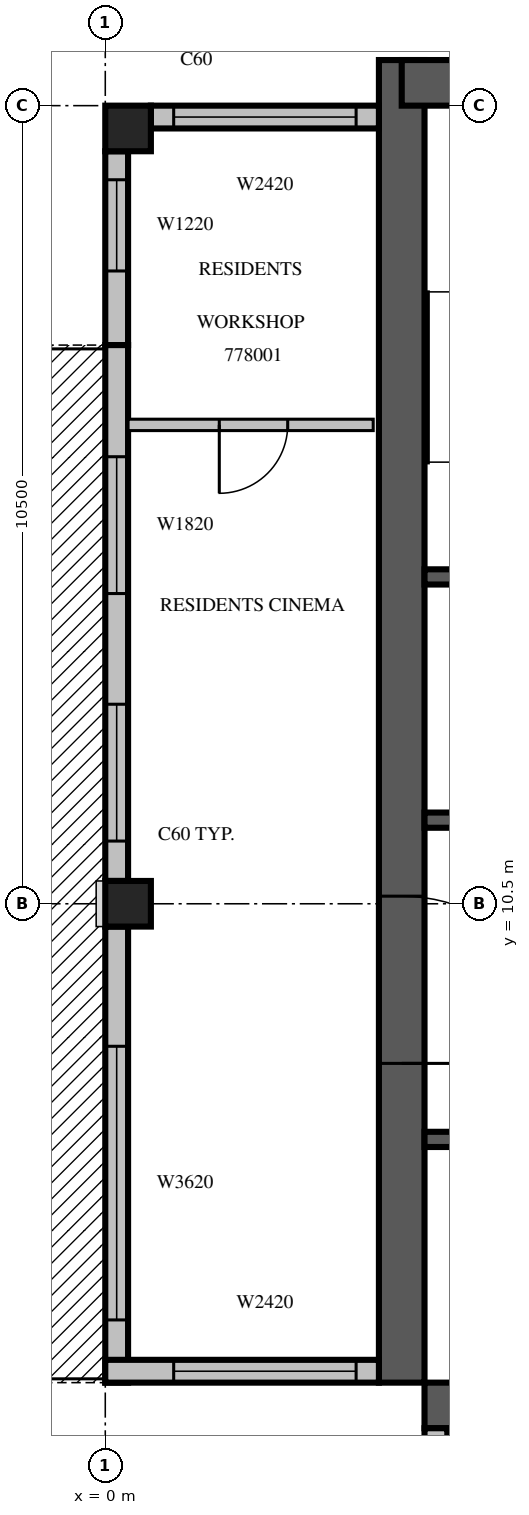
"""IFC4 building model, lengths in metres.
Left out: names, types, materials, properties, quantities, classifications, styles, units other than length and angle.
Written with IfcOpenShell. Run it as: python <this file> out.ifc"""

import sys

from ifc_helpers import new_model, si_unit, direction, frame, frame_2d, origin, origin_2d, place, context, subcontext, project, spatial, rectangle, extrude, source, transform, mapped, element, fill, save


model = new_model("IFC4")
c1 = context("Model", 3, precision=1e-05, world=origin(), true_north=direction((0.0, 1.0)))
c2 = subcontext(c1, "Body", "Model", "MODEL_VIEW")
j1 = project(units=[si_unit("LENGTHUNIT", "METRE"), si_unit("PLANEANGLEUNIT", "RADIAN")], contexts=[c1])
p1 = place(None, origin())
s1 = spatial("IfcSite", under=j1, at=p1, CompositionType="ELEMENT")
p2 = place(p1, origin())
s2 = spatial("IfcBuilding", under=s1, at=p2, CompositionType="ELEMENT")
p3 = place(p2, frame((0.0, 0.0, 333.5)))
s3 = spatial("IfcBuildingStorey", under=s2, at=p3, CompositionType="ELEMENT", Elevation=333.5)
m1 = source(origin(), c2, "Body", "SweptSolid", [
    extrude(rectangle(XDim=0.6, YDim=0.6, at=origin_2d()), origin(), (0.0, 0.0, 1.0), 3.5),
])
for number, where, z_axis, x_axis in (
    (1, (0.3, 10.5, 0.0), (0.0, 0.0, 1.0), (1.0, 0.0, 0.0)),
    (2, (0.3, 20.7, 0.0), (0.0, 0.0, 1.0), (1.0, 0.0, 0.0)),
):
    element("IfcColumn", number, at=place(p3, frame(where, z_axis=z_axis, x_axis=x_axis)), inside=s3, PredefinedType="COLUMN", context=c2, shape_type="MappedRepresentation", body=[
        mapped(m1, transform((0.0, 0.0, 0.0), scale=1.0)),
    ])
m2 = source(origin(), c2, "Body", "SweptSolid", [
    extrude(rectangle(XDim=17.4, YDim=0.6, at=frame_2d((8.7, 0.0))), origin(), (0.0, 0.0, 1.0), 3.5),
])
p4 = place(p3, frame((3.9, 4.2, 0.0), z_axis=(0.0, 0.0, 1.0), x_axis=(0.0, 1.0, 0.0)))
e3 = element("IfcWall", 3, at=p4, inside=s3, PredefinedType="SHEAR", context=c2, shape_type="MappedRepresentation", body=[
    mapped(m2, transform((0.0, 0.0, 0.0), scale=1.0)),
])
m3 = source(origin(), c2, "Body", "SweptSolid", [
    extrude(rectangle(XDim=2.2, YDim=2.1, at=frame_2d((1.1, 1.05))), frame((0.0, 0.31, 0.0), z_axis=(0.0, -1.0, 0.0), x_axis=(1.0, 0.0, 0.0)), (0.0, 0.0, 1.0), 0.62),
])
p5 = place(p4, frame((4.2, 0.0, 0.0)))
e4 = element("IfcOpeningElement", 4, at=p5, cuts=e3, PredefinedType="OPENING", context=c2, shape_type="MappedRepresentation", body=[
    mapped(m3, transform((0.0, 0.0, 0.0), scale=1.0)),
])
p6 = place(p3, frame((4.2, 3.9, 0.0), z_axis=(0.0, 0.0, 1.0), x_axis=(1.0, 0.0, 0.0)))
e5 = element("IfcWall", 5, at=p6, inside=s3, PredefinedType="SHEAR", context=c2, shape_type="MappedRepresentation", body=[
    mapped(m2, transform((0.0, 0.0, 0.0), scale=1.0)),
])
m4 = source(origin(), c2, "Body", "SweptSolid", [
    extrude(rectangle(XDim=0.9, YDim=2.1, at=frame_2d((0.45, 1.05))), frame((0.0, 0.31, 0.0), z_axis=(0.0, -1.0, 0.0), x_axis=(1.0, 0.0, 0.0)), (0.0, 0.0, 1.0), 0.62),
])
p7 = place(p6, frame((15.2, 0.0, 0.0)))
e6 = element("IfcOpeningElement", 6, at=p7, cuts=e5, PredefinedType="OPENING", context=c2, shape_type="MappedRepresentation", body=[
    mapped(m4, transform((0.0, 0.0, 0.0), scale=1.0)),
])
m5 = source(origin(), c2, "Body", "SweptSolid", [
    extrude(rectangle(XDim=6.6, YDim=0.6, at=frame_2d((3.3, 0.0))), origin(), (0.0, 0.0, 1.0), 3.5),
])
p8 = place(p3, frame((3.9, 21.3, 0.0), z_axis=(0.0, 0.0, 1.0), x_axis=(1.0, 0.0, 0.0)))
e7 = element("IfcWall", 7, at=p8, inside=s3, PredefinedType="SHEAR", context=c2, shape_type="MappedRepresentation", body=[
    mapped(m5, transform((0.0, 0.0, 0.0), scale=1.0)),
])
m6 = source(origin(), c2, "Body", "SweptSolid", [
    extrude(rectangle(XDim=1.2, YDim=2.4, at=frame_2d((0.6, 1.2))), frame((0.0, 0.31, 0.0), z_axis=(0.0, -1.0, 0.0), x_axis=(1.0, 0.0, 0.0)), (0.0, 0.0, 1.0), 0.62),
])
p9 = place(p8, frame((1.5, 0.0, 0.6)))
e8 = element("IfcOpeningElement", 8, at=p9, cuts=e7, PredefinedType="OPENING", context=c2, shape_type="MappedRepresentation", body=[
    mapped(m6, transform((0.0, 0.0, 0.0), scale=1.0)),
])
p10 = place(p8, frame((3.6, 0.0, 0.6)))
e9 = element("IfcOpeningElement", 9, at=p10, cuts=e7, PredefinedType="OPENING", context=c2, shape_type="MappedRepresentation", body=[
    mapped(m6, transform((0.0, 0.0, 0.0), scale=1.0)),
])
m7 = source(origin(), c2, "Body", "SweptSolid", [
    extrude(rectangle(XDim=3.0, YDim=0.3, at=frame_2d((1.5, 0.0))), origin(), (0.0, 0.0, 1.0), 3.1),
])
p11 = place(p3, frame((3.6, 20.85, 0.0), z_axis=(0.0, 0.0, 1.0), x_axis=(-1.0, 0.0, 0.0)))
e10 = element("IfcWall", 10, at=p11, inside=s3, PredefinedType="STANDARD", context=c2, shape_type="MappedRepresentation", body=[
    mapped(m7, transform((0.0, 0.0, 0.0), scale=1.0)),
])
m8 = source(origin(), c2, "Body", "SweptSolid", [
    extrude(rectangle(XDim=2.4, YDim=2.0, at=frame_2d((1.2, 1.0))), frame((0.0, 0.16, 0.0), z_axis=(0.0, -1.0, 0.0), x_axis=(1.0, 0.0, 0.0)), (0.0, 0.0, 1.0), 0.32),
])
p12 = place(p11, frame((0.3, 0.0, 0.6)))
e11 = element("IfcOpeningElement", 11, at=p12, cuts=e10, PredefinedType="OPENING", context=c2, shape_type="MappedRepresentation", body=[
    mapped(m8, transform((0.0, 0.0, 0.0), scale=1.0)),
])
p13 = place(p3, frame((0.15, 20.4, 0.0), z_axis=(0.0, 0.0, 1.0), x_axis=(0.0, -1.0, 0.0)))
e12 = element("IfcWall", 12, at=p13, inside=s3, PredefinedType="STANDARD", context=c2, shape_type="SweptSolid", body=[
    extrude(rectangle(XDim=2.55, YDim=0.3, at=frame_2d((1.275, 0.0))), origin(), (0.0, 0.0, 1.0), 3.1),
])
m9 = source(origin(), c2, "Body", "SweptSolid", [
    extrude(rectangle(XDim=1.2, YDim=2.0, at=frame_2d((0.6, 1.0))), frame((0.0, 0.16, 0.0), z_axis=(0.0, -1.0, 0.0), x_axis=(1.0, 0.0, 0.0)), (0.0, 0.0, 1.0), 0.32),
])
p14 = place(p13, frame((0.375, 0.0, 0.6)))
e13 = element("IfcOpeningElement", 13, at=p14, cuts=e12, PredefinedType="OPENING", context=c2, shape_type="MappedRepresentation", body=[
    mapped(m9, transform((0.0, 0.0, 0.0), scale=1.0)),
])
p15 = place(p3, frame((0.15, 17.85, 0.0), z_axis=(0.0, 0.0, 1.0), x_axis=(0.0, -1.0, 0.0)))
e14 = element("IfcWall", 14, at=p15, inside=s3, PredefinedType="STANDARD", context=c2, shape_type="SweptSolid", body=[
    extrude(rectangle(XDim=7.05, YDim=0.3, at=frame_2d((3.525, 0.0))), origin(), (0.0, 0.0, 1.0), 3.1),
])
m10 = source(origin(), c2, "Body", "SweptSolid", [
    extrude(rectangle(XDim=1.8, YDim=2.4, at=frame_2d((0.9, 1.2))), frame((0.0, 0.16, 0.0), z_axis=(0.0, -1.0, 0.0), x_axis=(1.0, 0.0, 0.0)), (0.0, 0.0, 1.0), 0.32),
])
p16 = place(p15, frame((4.725, 0.0, 0.0)))
e15 = element("IfcOpeningElement", 15, at=p16, cuts=e14, PredefinedType="OPENING", context=c2, shape_type="MappedRepresentation", body=[
    mapped(m10, transform((0.0, 0.0, 0.0), scale=1.0)),
])
m11 = source(origin(), c2, "Body", "SweptSolid", [
    extrude(rectangle(XDim=1.8, YDim=2.0, at=frame_2d((0.9, 1.0))), frame((0.0, 0.16, 0.0), z_axis=(0.0, -1.0, 0.0), x_axis=(1.0, 0.0, 0.0)), (0.0, 0.0, 1.0), 0.32),
])
p17 = place(p15, frame((1.469, 0.0, 0.6)))
e16 = element("IfcOpeningElement", 16, at=p17, cuts=e14, PredefinedType="OPENING", context=c2, shape_type="MappedRepresentation", body=[
    mapped(m11, transform((0.0, 0.0, 0.0), scale=1.0)),
])
m12 = source(origin(), c2, "Body", "SweptSolid", [
    extrude(rectangle(XDim=6.0, YDim=0.3, at=frame_2d((3.0, 0.0))), origin(), (0.0, 0.0, 1.0), 3.1),
])
p18 = place(p3, frame((0.15, 10.2, 0.0), z_axis=(0.0, 0.0, 1.0), x_axis=(0.0, -1.0, 0.0)))
e17 = element("IfcWall", 17, at=p18, inside=s3, PredefinedType="STANDARD", context=c2, shape_type="MappedRepresentation", body=[
    mapped(m12, transform((0.0, 0.0, 0.0), scale=1.0)),
])
m13 = source(origin(), c2, "Body", "SweptSolid", [
    extrude(rectangle(XDim=3.6, YDim=2.0, at=frame_2d((1.8, 1.0))), frame((0.0, 0.16, 0.0), z_axis=(0.0, -1.0, 0.0), x_axis=(1.0, 0.0, 0.0)), (0.0, 0.0, 1.0), 0.32),
])
p19 = place(p18, frame((1.575, 0.0, 0.6)))
e18 = element("IfcOpeningElement", 18, at=p19, cuts=e17, PredefinedType="OPENING", context=c2, shape_type="MappedRepresentation", body=[
    mapped(m13, transform((0.0, 0.0, 0.0), scale=1.0)),
])
m14 = source(origin(), c2, "Body", "SweptSolid", [
    extrude(rectangle(XDim=3.6, YDim=0.3, at=frame_2d((1.8, 0.0))), origin(), (0.0, 0.0, 1.0), 3.1),
])
p20 = place(p3, frame((0.0, 4.35, 0.0), z_axis=(0.0, 0.0, 1.0), x_axis=(1.0, 0.0, 0.0)))
e19 = element("IfcWall", 19, at=p20, inside=s3, PredefinedType="STANDARD", context=c2, shape_type="MappedRepresentation", body=[
    mapped(m14, transform((0.0, 0.0, 0.0), scale=1.0)),
])
p21 = place(p20, frame((0.9, 0.0, 0.6)))
e20 = element("IfcOpeningElement", 20, at=p21, cuts=e19, PredefinedType="OPENING", context=c2, shape_type="MappedRepresentation", body=[
    mapped(m8, transform((0.0, 0.0, 0.0), scale=1.0)),
])
p22 = place(p3, frame((4.35, 3.6, 0.0), z_axis=(0.0, 0.0, 1.0), x_axis=(0.0, -1.0, 0.0)))
e21 = element("IfcWall", 21, at=p22, inside=s3, PredefinedType="STANDARD", context=c2, shape_type="MappedRepresentation", body=[
    mapped(m14, transform((0.0, 0.0, 0.0), scale=1.0)),
])
p23 = place(p22, frame((0.3, 0.0, 0.6)))
e22 = element("IfcOpeningElement", 22, at=p23, cuts=e21, PredefinedType="OPENING", context=c2, shape_type="MappedRepresentation", body=[
    mapped(m8, transform((0.0, 0.0, 0.0), scale=1.0)),
])
m15 = source(origin(), c2, "Body", "SweptSolid", [
    extrude(rectangle(XDim=9.6, YDim=0.2, at=frame_2d((4.8, 0.0))), origin(), (0.0, 0.0, 1.0), 3.5),
])
p24 = place(p3, frame((4.2, 7.4, 0.0), z_axis=(0.0, 0.0, 1.0), x_axis=(1.0, 0.0, 0.0)))
e23 = element("IfcWall", 23, at=p24, inside=s3, PredefinedType="SOLIDWALL", context=c2, shape_type="MappedRepresentation", body=[
    mapped(m15, transform((0.0, 0.0, 0.0), scale=1.0)),
])
m16 = source(origin(), c2, "Body", "SweptSolid", [
    extrude(rectangle(XDim=1.1, YDim=2.1, at=frame_2d((0.55, 1.05))), frame((0.0, 0.11, 0.0), z_axis=(0.0, -1.0, 0.0), x_axis=(1.0, 0.0, 0.0)), (0.0, 0.0, 1.0), 0.22),
])
p25 = place(p24, frame((0.65, 0.0, 0.0)))
e24 = element("IfcOpeningElement", 24, at=p25, cuts=e23, PredefinedType="OPENING", context=c2, shape_type="MappedRepresentation", body=[
    mapped(m16, transform((0.0, 0.0, 0.0), scale=1.0)),
])
p26 = place(p24, frame((3.05, 0.0, 0.0)))
e25 = element("IfcOpeningElement", 25, at=p26, cuts=e23, PredefinedType="OPENING", context=c2, shape_type="MappedRepresentation", body=[
    mapped(m16, transform((0.0, 0.0, 0.0), scale=1.0)),
])
p27 = place(p24, frame((5.45, 0.0, 0.0)))
e26 = element("IfcOpeningElement", 26, at=p27, cuts=e23, PredefinedType="OPENING", context=c2, shape_type="MappedRepresentation", body=[
    mapped(m16, transform((0.0, 0.0, 0.0), scale=1.0)),
])
p28 = place(p24, frame((7.85, 0.0, 0.0)))
e27 = element("IfcOpeningElement", 27, at=p28, cuts=e23, PredefinedType="OPENING", context=c2, shape_type="MappedRepresentation", body=[
    mapped(m16, transform((0.0, 0.0, 0.0), scale=1.0)),
])
m17 = source(origin(), c2, "Body", "SweptSolid", [
    extrude(rectangle(XDim=4.8, YDim=0.2, at=frame_2d((2.4, 0.0))), origin(), (0.0, 0.0, 1.0), 3.5),
])
p29 = place(p3, frame((4.2, 11.6, 0.0), z_axis=(0.0, 0.0, 1.0), x_axis=(1.0, 0.0, 0.0)))
e28 = element("IfcWall", 28, at=p29, inside=s3, PredefinedType="SOLIDWALL", context=c2, shape_type="MappedRepresentation", body=[
    mapped(m17, transform((0.0, 0.0, 0.0), scale=1.0)),
])
p30 = place(p29, frame((0.65, 0.0, 0.0)))
e29 = element("IfcOpeningElement", 29, at=p30, cuts=e28, PredefinedType="OPENING", context=c2, shape_type="MappedRepresentation", body=[
    mapped(m16, transform((0.0, 0.0, 0.0), scale=1.0)),
])
p31 = place(p29, frame((3.05, 0.0, 0.0)))
e30 = element("IfcOpeningElement", 30, at=p31, cuts=e28, PredefinedType="OPENING", context=c2, shape_type="MappedRepresentation", body=[
    mapped(m16, transform((0.0, 0.0, 0.0), scale=1.0)),
])
p32 = place(p3, frame((4.2, 14.8, 0.0), z_axis=(0.0, 0.0, 1.0), x_axis=(1.0, 0.0, 0.0)))
e31 = element("IfcWall", 31, at=p32, inside=s3, PredefinedType="SOLIDWALL", context=c2, shape_type="MappedRepresentation", body=[
    mapped(m17, transform((0.0, 0.0, 0.0), scale=1.0)),
])
m18 = source(origin(), c2, "Body", "SweptSolid", [
    extrude(rectangle(XDim=3.225, YDim=0.15, at=frame_2d((1.613, 0.0))), origin(), (0.0, 0.0, 1.0), 3.1),
])
p33 = place(p3, frame((0.3, 16.8, 0.0), z_axis=(0.0, 0.0, 1.0), x_axis=(1.0, 0.0, 0.0)))
e32 = element("IfcWall", 32, at=p33, inside=s3, PredefinedType="PARTITIONING", context=c2, shape_type="MappedRepresentation", body=[
    mapped(m18, transform((0.0, 0.0, 0.0), scale=1.0)),
])
m19 = source(origin(), c2, "Body", "SweptSolid", [
    extrude(rectangle(XDim=0.9, YDim=2.1, at=frame_2d((0.45, 1.05))), frame((0.0, 0.085, 0.0), z_axis=(0.0, -1.0, 0.0), x_axis=(1.0, 0.0, 0.0)), (0.0, 0.0, 1.0), 0.17),
])
p34 = place(p33, frame((1.2, 0.0, 0.0)))
e33 = element("IfcOpeningElement", 33, at=p34, cuts=e32, PredefinedType="OPENING", context=c2, shape_type="MappedRepresentation", body=[
    mapped(m19, transform((0.0, 0.0, 0.0), scale=1.0)),
])
m20 = source(origin(), c2, "Body", "SweptSolid", [
    extrude(rectangle(XDim=2.4, YDim=2.0, at=frame_2d((1.2, 1.0))), frame((0.0, 0.03, 0.0), z_axis=(0.0, -1.0, 0.0), x_axis=(1.0, 0.0, 0.0)), (0.0, 0.0, 1.0), 0.06),
])
p35 = place(p12, origin())
e34 = element("IfcWindow", 34, at=p35, inside=s3, PartitioningType="SINGLE_PANEL", PredefinedType="WINDOW", context=c2, shape_type="MappedRepresentation", body=[
    mapped(m20, transform((0.0, 0.0, 0.0), scale=1.0)),
])
fill(e11, e34)
m21 = source(origin(), c2, "Body", "SweptSolid", [
    extrude(rectangle(XDim=1.2, YDim=2.0, at=frame_2d((0.6, 1.0))), frame((0.0, 0.03, 0.0), z_axis=(0.0, -1.0, 0.0), x_axis=(1.0, 0.0, 0.0)), (0.0, 0.0, 1.0), 0.06),
])
p36 = place(p14, origin())
e35 = element("IfcWindow", 35, at=p36, inside=s3, PartitioningType="SINGLE_PANEL", PredefinedType="WINDOW", context=c2, shape_type="MappedRepresentation", body=[
    mapped(m21, transform((0.0, 0.0, 0.0), scale=1.0)),
])
fill(e13, e35)
m22 = source(origin(), c2, "Body", "SweptSolid", [
    extrude(rectangle(XDim=1.8, YDim=2.4, at=frame_2d((0.9, 1.2))), frame((0.0, 0.025, 0.0), z_axis=(0.0, -1.0, 0.0), x_axis=(1.0, 0.0, 0.0)), (0.0, 0.0, 1.0), 0.05),
])
p37 = place(p16, origin())
e36 = element("IfcDoor", 36, at=p37, inside=s3, OperationType="SLIDING_TO_LEFT", PredefinedType="DOOR", context=c2, shape_type="MappedRepresentation", body=[
    mapped(m22, transform((0.0, 0.0, 0.0), scale=1.0)),
])
fill(e15, e36)
m23 = source(origin(), c2, "Body", "SweptSolid", [
    extrude(rectangle(XDim=3.6, YDim=2.0, at=frame_2d((1.8, 1.0))), frame((0.0, 0.03, 0.0), z_axis=(0.0, -1.0, 0.0), x_axis=(1.0, 0.0, 0.0)), (0.0, 0.0, 1.0), 0.06),
])
p38 = place(p19, origin())
e37 = element("IfcWindow", 37, at=p38, inside=s3, PartitioningType="SINGLE_PANEL", PredefinedType="WINDOW", context=c2, shape_type="MappedRepresentation", body=[
    mapped(m23, transform((0.0, 0.0, 0.0), scale=1.0)),
])
fill(e18, e37)
m24 = source(origin(), c2, "Body", "SweptSolid", [
    extrude(rectangle(XDim=1.8, YDim=2.0, at=frame_2d((0.9, 1.0))), frame((0.0, 0.03, 0.0), z_axis=(0.0, -1.0, 0.0), x_axis=(1.0, 0.0, 0.0)), (0.0, 0.0, 1.0), 0.06),
])
p39 = place(p17, origin())
e38 = element("IfcWindow", 38, at=p39, inside=s3, PartitioningType="SINGLE_PANEL", PredefinedType="WINDOW", context=c2, shape_type="MappedRepresentation", body=[
    mapped(m24, transform((0.0, 0.0, 0.0), scale=1.0)),
])
fill(e16, e38)
p40 = place(p21, origin())
e39 = element("IfcWindow", 39, at=p40, inside=s3, PartitioningType="SINGLE_PANEL", PredefinedType="WINDOW", context=c2, shape_type="MappedRepresentation", body=[
    mapped(m20, transform((0.0, 0.0, 0.0), scale=1.0)),
])
fill(e20, e39)
m25 = source(origin(), c2, "Body", "SweptSolid", [
    extrude(rectangle(XDim=2.2, YDim=2.1, at=frame_2d((1.1, 1.05))), frame((0.0, 0.025, 0.0), z_axis=(0.0, -1.0, 0.0), x_axis=(1.0, 0.0, 0.0)), (0.0, 0.0, 1.0), 0.05),
])
p41 = place(p5, origin())
e40 = element("IfcDoor", 40, at=p41, inside=s3, OperationType="DOUBLE_DOOR_SINGLE_SWING", PredefinedType="DOOR", context=c2, shape_type="MappedRepresentation", body=[
    mapped(m25, transform((0.0, 0.0, 0.0), scale=1.0)),
])
fill(e4, e40)
m26 = source(origin(), c2, "Body", "SweptSolid", [
    extrude(rectangle(XDim=0.9, YDim=2.1, at=frame_2d((0.45, 1.05))), frame((0.0, 0.025, 0.0), z_axis=(0.0, -1.0, 0.0), x_axis=(1.0, 0.0, 0.0)), (0.0, 0.0, 1.0), 0.05),
])
p42 = place(p34, origin())
e41 = element("IfcDoor", 41, at=p42, inside=s3, OperationType="SINGLE_SWING_RIGHT", PredefinedType="DOOR", context=c2, shape_type="MappedRepresentation", body=[
    mapped(m26, transform((0.0, 0.0, 0.0), scale=1.0)),
])
fill(e33, e41)
save(model, sys.argv[1])
